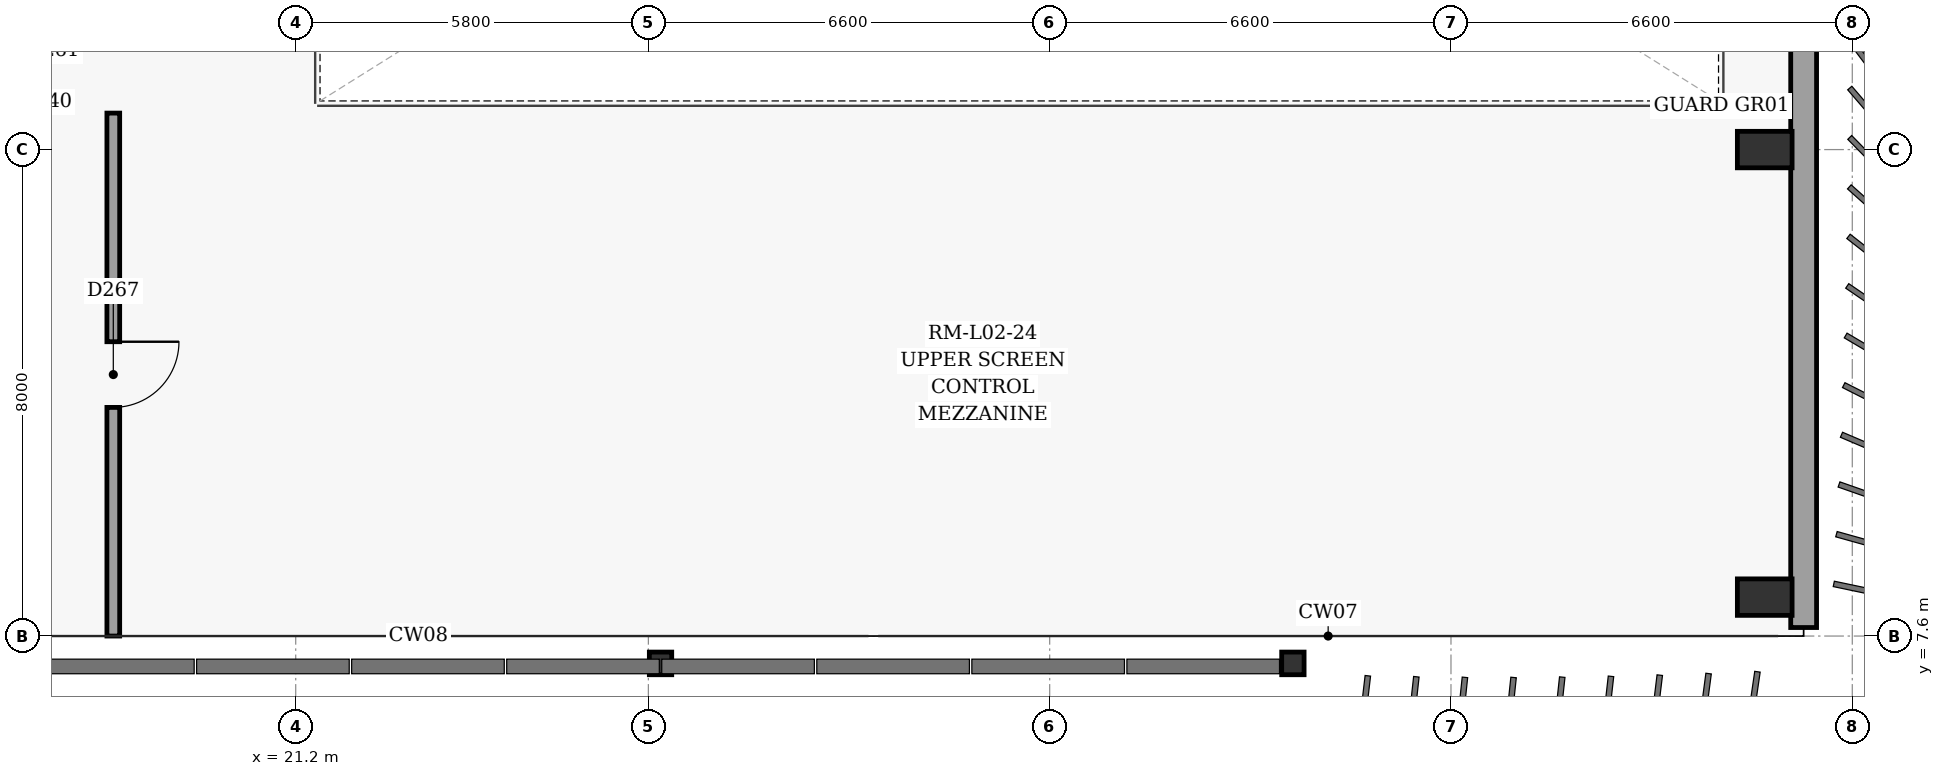
"""IFC4 building model, lengths in metres.
Left out: names, types, materials, properties, quantities, classifications, styles, units other than length and angle.
Written with IfcOpenShell. Run it as: python <this file> out.ifc"""

import sys

from ifc_helpers import new_model, si_unit, direction, frame, frame_2d, origin, origin_2d, place, context, subcontext, project, spatial, rectangle, i_section, extrude, element, fill, save


model = new_model("IFC4")
c1 = context("Model", 3, precision=1e-05, world=origin(), true_north=direction((0.0, 1.0)))
c2 = subcontext(c1, "Body", "Model", "MODEL_VIEW")
j1 = project(units=[si_unit("LENGTHUNIT", "METRE"), si_unit("PLANEANGLEUNIT", "RADIAN")], contexts=[c1])
p1 = place(None, origin())
s1 = spatial("IfcSite", under=j1, at=p1, CompositionType="ELEMENT")
p2 = place(p1, origin())
s2 = spatial("IfcBuilding", under=s1, at=p2, CompositionType="ELEMENT")
p3 = place(p2, frame((0.0, 0.0, 10.2)))
s3 = spatial("IfcBuildingStorey", under=s2, at=p3, CompositionType="ELEMENT", Elevation=10.2)
for number, where, z_axis, x_axis in (
    (1, (45.36, 8.24, 0.0), (0.0, 0.0, 1.0), (1.0, 0.0, 0.0)),
    (2, (45.36, 15.6, 0.0), (0.0, 0.0, 1.0), (1.0, 0.0, 0.0)),
):
    element("IfcColumn", number, at=place(p3, frame(where, z_axis=z_axis, x_axis=x_axis)), inside=s3, PredefinedType="COLUMN", context=c2, shape_type="SweptSolid", body=[
        extrude(rectangle(XDim=0.6, YDim=0.9, at=origin_2d()), origin(), (0.0, 0.0, 1.0), 5.4),
    ])
for number, where, z_axis, x_axis in (
    (3, (27.2, 7.15, 0.0), (0.0, 0.0, 1.0), (1.0, 0.0, 0.0)),
    (4, (37.6, 7.15, 0.0), (0.0, 0.0, 1.0), (1.0, 0.0, 0.0)),
):
    element("IfcColumn", number, at=place(p3, frame(where, z_axis=z_axis, x_axis=x_axis)), inside=s3, PredefinedType="COLUMN", context=c2, shape_type="SweptSolid", body=[
        extrude(i_section(OverallWidth=0.373, OverallDepth=0.368, WebThickness=0.014, FlangeThickness=0.024, at=origin_2d()), origin(), (0.0, 0.0, 1.0), 5.4),
    ])
p4 = place(p3, frame((46.0, 63.46, 0.0), z_axis=(0.0, 0.0, 1.0), x_axis=(0.0, -1.0, 0.0)))
e5 = element("IfcWall", 5, at=p4, inside=s3, PredefinedType="SOLIDWALL", context=c2, shape_type="SweptSolid", body=[
    extrude(rectangle(XDim=55.72, YDim=0.425, at=frame_2d((27.86, 0.0))), origin(), (0.0, 0.0, 1.0), 5.16),
])
p5 = place(p3, frame((18.2, 16.2, 0.0), z_axis=(0.0, 0.0, 1.0), x_axis=(0.0, -1.0, 0.0)))
e6 = element("IfcWall", 6, at=p5, inside=s3, PredefinedType="PARTITIONING", context=c2, shape_type="SweptSolid", body=[
    extrude(rectangle(XDim=8.6, YDim=0.21, at=frame_2d((4.3, 0.0))), origin(), (0.0, 0.0, 1.0), 5.16),
])
p6 = place(p5, frame((3.76, 0.0, 0.0)))
e7 = element("IfcOpeningElement", 7, at=p6, cuts=e6, PredefinedType="OPENING", context=c2, shape_type="SweptSolid", body=[
    extrude(rectangle(XDim=1.08, YDim=2.15, at=frame_2d((0.54, 1.075))), frame((0.0, 0.115, 0.0), z_axis=(0.0, -1.0, 0.0), x_axis=(1.0, 0.0, 0.0)), (0.0, 0.0, 1.0), 0.23),
])
p7 = place(p6, origin())
e8 = element("IfcDoor", 8, at=p7, inside=s3, OperationType="SINGLE_SWING_LEFT", PredefinedType="DOOR", context=c2, shape_type="SweptSolid", body=[
    extrude(rectangle(XDim=1.08, YDim=2.15, at=frame_2d((0.54, 1.075))), frame((0.0, 0.025, 0.0), z_axis=(0.0, -1.0, 0.0), x_axis=(1.0, 0.0, 0.0)), (0.0, 0.0, 1.0), 0.05),
])
fill(e7, e8)
save(model, sys.argv[1])
